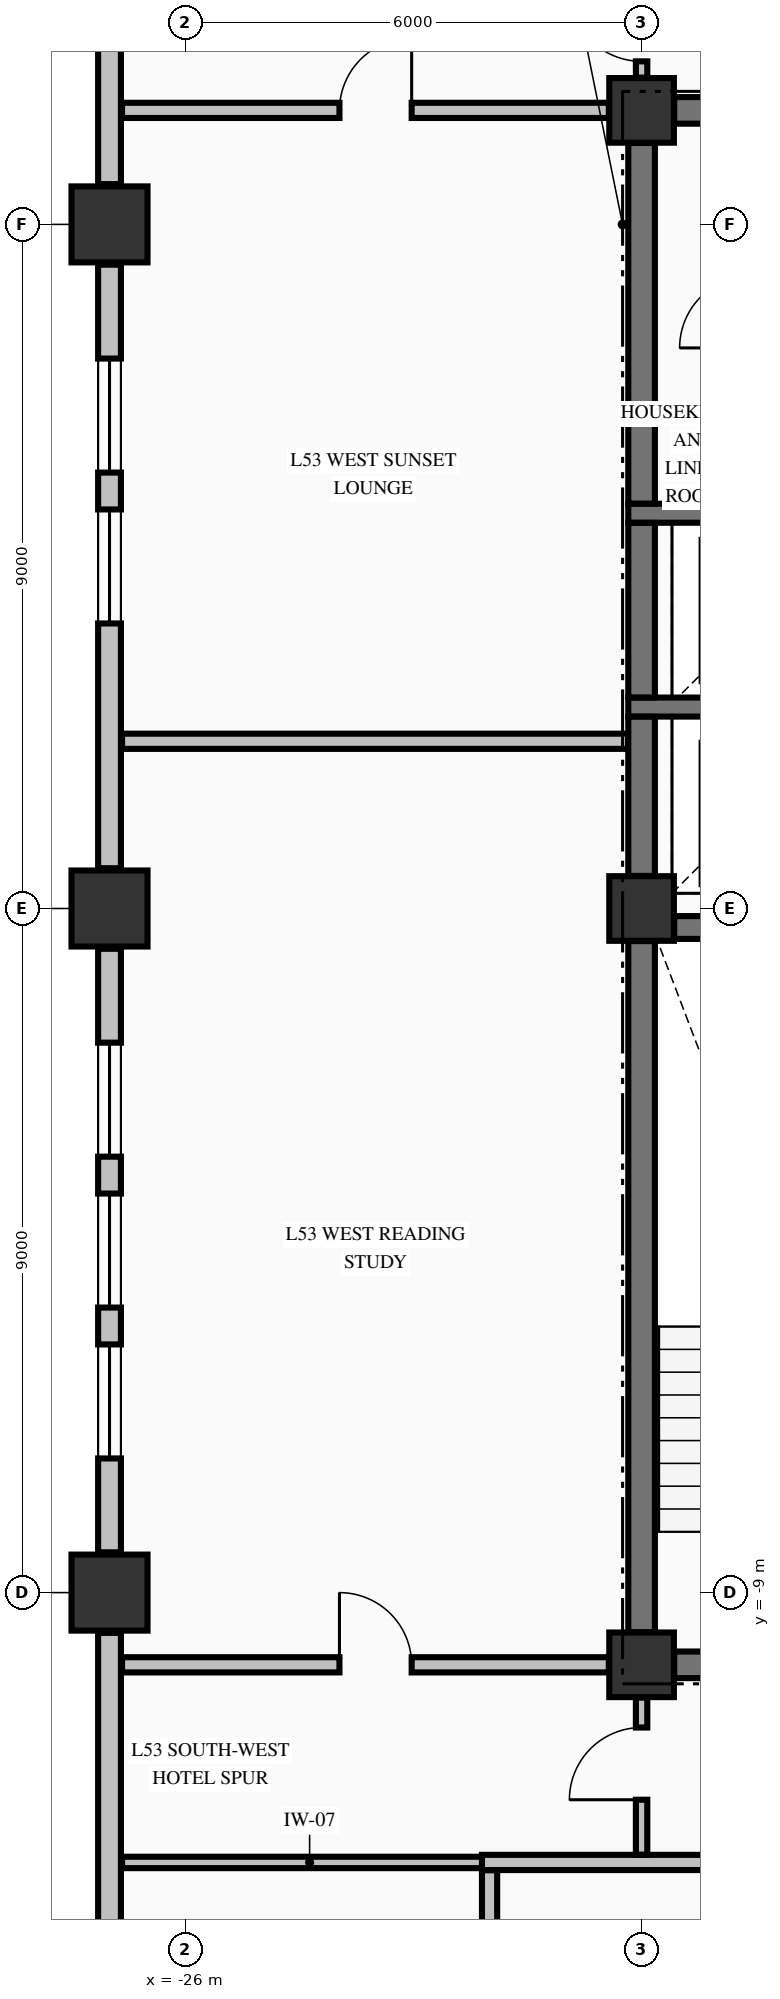
"""IFC4 building model, lengths in metres.
Left out: names, types, materials, properties, quantities, classifications, styles, units other than length and angle.
Written with IfcOpenShell. Run it as: python <this file> out.ifc"""

import sys

from ifc_helpers import new_model, si_unit, direction, frame, frame_2d, origin, origin_2d, place, context, subcontext, project, spatial, rectangle, extrude, element, fill, save


model = new_model("IFC4")
c1 = context("Model", 3, precision=1e-05, world=origin(), true_north=direction((0.0, 1.0)))
c2 = subcontext(c1, "Body", "Model", "MODEL_VIEW")
j1 = project(units=[si_unit("LENGTHUNIT", "METRE"), si_unit("PLANEANGLEUNIT", "RADIAN")], contexts=[c1])
p1 = place(None, origin())
s1 = spatial("IfcSite", under=j1, at=p1, CompositionType="ELEMENT")
p2 = place(p1, origin())
s2 = spatial("IfcBuilding", under=s1, at=p2, CompositionType="ELEMENT")
p3 = place(p2, frame((0.0, 0.0, 205.06)))
s3 = spatial("IfcBuildingStorey", under=s2, at=p3, CompositionType="ELEMENT", Elevation=205.06)
for number, where, z_axis, x_axis in (
    (1, (-27.0, -9.0, -0.25), (0.0, 0.0, 1.0), (1.0, 0.0, 0.0)),
    (2, (-27.0, 0.0, -0.25), (0.0, 0.0, 1.0), (1.0, 0.0, 0.0)),
    (3, (-27.0, 9.0, -0.25), (0.0, 0.0, 1.0), (1.0, 0.0, 0.0)),
):
    element("IfcColumn", number, at=place(p3, frame(where, z_axis=z_axis, x_axis=x_axis)), inside=s3, PredefinedType="COLUMN", context=c2, shape_type="SweptSolid", body=[
        extrude(rectangle(XDim=1.0, YDim=1.0, at=origin_2d()), origin(), (0.0, 0.0, 1.0), 3.4),
    ])
for number, where, z_axis, x_axis in (
    (4, (-20.0, -9.95, -0.25), (0.0, 0.0, 1.0), (1.0, 0.0, 0.0)),
    (5, (-20.0, 10.5, -0.25), (0.0, 0.0, 1.0), (1.0, 0.0, 0.0)),
    (6, (-20.0, 0.0, -0.25), (0.0, 0.0, 1.0), (1.0, 0.0, 0.0)),
):
    element("IfcColumn", number, at=place(p3, frame(where, z_axis=z_axis, x_axis=x_axis)), inside=s3, PredefinedType="COLUMN", context=c2, shape_type="SweptSolid", body=[
        extrude(rectangle(XDim=0.85, YDim=0.85, at=origin_2d()), origin(), (0.0, 0.0, 1.0), 3.4),
    ])
p4 = place(p3, frame((-27.0, -9.53, 0.0), z_axis=(0.0, 0.0, 1.0), x_axis=(0.0, -1.0, 0.0)))
e7 = element("IfcWall", 7, at=p4, inside=s3, PredefinedType="STANDARD", context=c2, shape_type="SweptSolid", body=[
    extrude(rectangle(XDim=9.44, YDim=0.3, at=frame_2d((4.72, 0.0))), origin(), (0.0, 0.0, 1.0), 2.542),
])
p5 = place(p3, frame((-27.0, -0.53, 0.0), z_axis=(0.0, 0.0, 1.0), x_axis=(0.0, -1.0, 0.0)))
e8 = element("IfcWall", 8, at=p5, inside=s3, PredefinedType="STANDARD", context=c2, shape_type="SweptSolid", body=[
    extrude(rectangle(XDim=7.94, YDim=0.3, at=frame_2d((3.97, 0.0))), origin(), (0.0, 0.0, 1.0), 2.542),
])
p6 = place(p5, frame((1.235, 0.0, 0.72)))
e9 = element("IfcOpeningElement", 9, at=p6, cuts=e8, PredefinedType="OPENING", context=c2, shape_type="SweptSolid", body=[
    extrude(rectangle(XDim=1.5, YDim=1.6, at=frame_2d((0.75, 0.8))), frame((0.0, 0.16, 0.0), z_axis=(0.0, -1.0, 0.0), x_axis=(1.0, 0.0, 0.0)), (0.0, 0.0, 1.0), 0.32),
])
p7 = place(p5, frame((3.22, 0.0, 0.72)))
e10 = element("IfcOpeningElement", 10, at=p7, cuts=e8, PredefinedType="OPENING", context=c2, shape_type="SweptSolid", body=[
    extrude(rectangle(XDim=1.5, YDim=1.6, at=frame_2d((0.75, 0.8))), frame((0.0, 0.16, 0.0), z_axis=(0.0, -1.0, 0.0), x_axis=(1.0, 0.0, 0.0)), (0.0, 0.0, 1.0), 0.32),
])
p8 = place(p5, frame((5.205, 0.0, 0.72)))
e11 = element("IfcOpeningElement", 11, at=p8, cuts=e8, PredefinedType="OPENING", context=c2, shape_type="SweptSolid", body=[
    extrude(rectangle(XDim=1.5, YDim=1.6, at=frame_2d((0.75, 0.8))), frame((0.0, 0.16, 0.0), z_axis=(0.0, -1.0, 0.0), x_axis=(1.0, 0.0, 0.0)), (0.0, 0.0, 1.0), 0.32),
])
p9 = place(p3, frame((-27.0, 8.47, 0.0), z_axis=(0.0, 0.0, 1.0), x_axis=(0.0, -1.0, 0.0)))
e12 = element("IfcWall", 12, at=p9, inside=s3, PredefinedType="STANDARD", context=c2, shape_type="SweptSolid", body=[
    extrude(rectangle(XDim=7.94, YDim=0.3, at=frame_2d((3.97, 0.0))), origin(), (0.0, 0.0, 1.0), 2.542),
])
p10 = place(p9, frame((1.235, 0.0, 0.72)))
e13 = element("IfcOpeningElement", 13, at=p10, cuts=e12, PredefinedType="OPENING", context=c2, shape_type="SweptSolid", body=[
    extrude(rectangle(XDim=1.5, YDim=1.6, at=frame_2d((0.75, 0.8))), frame((0.0, 0.16, 0.0), z_axis=(0.0, -1.0, 0.0), x_axis=(1.0, 0.0, 0.0)), (0.0, 0.0, 1.0), 0.32),
])
p11 = place(p9, frame((3.22, 0.0, 0.72)))
e14 = element("IfcOpeningElement", 14, at=p11, cuts=e12, PredefinedType="OPENING", context=c2, shape_type="SweptSolid", body=[
    extrude(rectangle(XDim=1.5, YDim=1.6, at=frame_2d((0.75, 0.8))), frame((0.0, 0.16, 0.0), z_axis=(0.0, -1.0, 0.0), x_axis=(1.0, 0.0, 0.0)), (0.0, 0.0, 1.0), 0.32),
])
p12 = place(p3, frame((-27.0, 18.97, 0.0), z_axis=(0.0, 0.0, 1.0), x_axis=(0.0, -1.0, 0.0)))
e15 = element("IfcWall", 15, at=p12, inside=s3, PredefinedType="STANDARD", context=c2, shape_type="SweptSolid", body=[
    extrude(rectangle(XDim=9.44, YDim=0.3, at=frame_2d((4.72, 0.0))), origin(), (0.0, 0.0, 1.0), 2.542),
])
p13 = place(p3, frame((-19.571, -9.95, 0.0), z_axis=(0.0, 0.0, 1.0), x_axis=(1.0, 0.0, 0.0)))
e16 = element("IfcWall", 16, at=p13, inside=s3, PredefinedType="SHEAR", context=c2, shape_type="SweptSolid", body=[
    extrude(rectangle(XDim=4.871, YDim=0.35, at=frame_2d((2.436, 0.0))), origin(), (0.0, 0.0, 1.0), 3.15),
])
p14 = place(p13, frame((0.746, 0.0, 0.0)))
e17 = element("IfcOpeningElement", 17, at=p14, cuts=e16, PredefinedType="OPENING", context=c2, shape_type="SweptSolid", body=[
    extrude(rectangle(XDim=1.05, YDim=2.15, at=frame_2d((0.525, 1.075))), frame((0.0, 0.185, 0.0), z_axis=(0.0, -1.0, 0.0), x_axis=(1.0, 0.0, 0.0)), (0.0, 0.0, 1.0), 0.37),
])
p15 = place(p3, frame((-19.571, -0.25, 0.0), z_axis=(0.0, 0.0, 1.0), x_axis=(1.0, 0.0, 0.0)))
e18 = element("IfcWall", 18, at=p15, inside=s3, PredefinedType="SHEAR", context=c2, shape_type="SweptSolid", body=[
    extrude(rectangle(XDim=8.142, YDim=0.3, at=frame_2d((4.071, 0.0))), origin(), (0.0, 0.0, 1.0), 3.15),
])
p16 = place(p15, frame((5.871, 0.0, 0.0)))
e19 = element("IfcOpeningElement", 19, at=p16, cuts=e18, PredefinedType="OPENING", context=c2, shape_type="SweptSolid", body=[
    extrude(rectangle(XDim=1.1, YDim=2.15, at=frame_2d((0.55, 1.075))), frame((0.0, 0.16, 0.0), z_axis=(0.0, -1.0, 0.0), x_axis=(1.0, 0.0, 0.0)), (0.0, 0.0, 1.0), 0.32),
])
for number, where, z_axis, x_axis in (
    (20, (-20.175, 2.65, 0.0), (0.0, 0.0, 1.0), (1.0, 0.0, 0.0)),
    (21, (-20.175, 5.2, 0.0), (0.0, 0.0, 1.0), (1.0, 0.0, 0.0)),
):
    element("IfcWall", number, at=place(p3, frame(where, z_axis=z_axis, x_axis=x_axis)), inside=s3, PredefinedType="SOLIDWALL", context=c2, shape_type="SweptSolid", body=[
        extrude(rectangle(XDim=3.2, YDim=0.25, at=frame_2d((1.6, 0.0))), origin(), (0.0, 0.0, 1.0), 3.15),
    ])
p17 = place(p3, frame((-19.571, 10.5, 0.0), z_axis=(0.0, 0.0, 1.0), x_axis=(1.0, 0.0, 0.0)))
e22 = element("IfcWall", 22, at=p17, inside=s3, PredefinedType="SHEAR", context=c2, shape_type="SweptSolid", body=[
    extrude(rectangle(XDim=4.871, YDim=0.35, at=frame_2d((2.436, 0.0))), origin(), (0.0, 0.0, 1.0), 3.15),
])
p18 = place(p17, frame((3.121, 0.0, 0.0)))
e23 = element("IfcOpeningElement", 23, at=p18, cuts=e22, PredefinedType="OPENING", context=c2, shape_type="SweptSolid", body=[
    extrude(rectangle(XDim=1.1, YDim=2.15, at=frame_2d((0.55, 1.075))), frame((0.0, 0.185, 0.0), z_axis=(0.0, -1.0, 0.0), x_axis=(1.0, 0.0, 0.0)), (0.0, 0.0, 1.0), 0.37),
])
p19 = place(p17, frame((1.276, 0.0, 0.0)))
e24 = element("IfcOpeningElement", 24, at=p19, cuts=e22, PredefinedType="OPENING", context=c2, shape_type="SweptSolid", body=[
    extrude(rectangle(XDim=0.95, YDim=2.15, at=frame_2d((0.475, 1.075))), frame((0.0, 0.185, 0.0), z_axis=(0.0, -1.0, 0.0), x_axis=(1.0, 0.0, 0.0)), (0.0, 0.0, 1.0), 0.37),
])
p20 = place(p3, frame((-26.835, -12.55, 0.0), z_axis=(0.0, 0.0, 1.0), x_axis=(1.0, 0.0, 0.0)))
e25 = element("IfcWall", 25, at=p20, inside=s3, PredefinedType="PARTITIONING", context=c2, shape_type="SweptSolid", body=[
    extrude(rectangle(XDim=4.935, YDim=0.15, at=frame_2d((2.468, 0.0))), origin(), (0.0, 0.0, 1.0), 3.15),
])
p21 = place(p3, frame((-22.1, -12.55, 0.0), z_axis=(0.0, 0.0, 1.0), x_axis=(1.0, 0.0, 0.0)))
e26 = element("IfcWall", 26, at=p21, inside=s3, PredefinedType="PARTITIONING", context=c2, shape_type="SweptSolid", body=[
    extrude(rectangle(XDim=39.2, YDim=0.2, at=frame_2d((19.6, 0.0))), origin(), (0.0, 0.0, 1.0), 3.15),
])
p22 = place(p21, frame((3.525, 0.0, 0.0)))
e27 = element("IfcOpeningElement", 27, at=p22, cuts=e26, PredefinedType="OPENING", context=c2, shape_type="SweptSolid", body=[
    extrude(rectangle(XDim=0.95, YDim=2.15, at=frame_2d((0.475, 1.075))), frame((0.0, 0.11, 0.0), z_axis=(0.0, -1.0, 0.0), x_axis=(1.0, 0.0, 0.0)), (0.0, 0.0, 1.0), 0.22),
])
p23 = place(p21, frame((11.475, 0.0, 0.0)))
e28 = element("IfcOpeningElement", 28, at=p23, cuts=e26, PredefinedType="OPENING", context=c2, shape_type="SweptSolid", body=[
    extrude(rectangle(XDim=0.95, YDim=2.15, at=frame_2d((0.475, 1.075))), frame((0.0, 0.11, 0.0), z_axis=(0.0, -1.0, 0.0), x_axis=(1.0, 0.0, 0.0)), (0.0, 0.0, 1.0), 0.22),
])
p24 = place(p21, frame((19.775, 0.0, 0.0)))
e29 = element("IfcOpeningElement", 29, at=p24, cuts=e26, PredefinedType="OPENING", context=c2, shape_type="SweptSolid", body=[
    extrude(rectangle(XDim=0.95, YDim=2.15, at=frame_2d((0.475, 1.075))), frame((0.0, 0.11, 0.0), z_axis=(0.0, -1.0, 0.0), x_axis=(1.0, 0.0, 0.0)), (0.0, 0.0, 1.0), 0.22),
])
p25 = place(p21, frame((34.675, 0.0, 0.0)))
e30 = element("IfcOpeningElement", 30, at=p25, cuts=e26, PredefinedType="OPENING", context=c2, shape_type="SweptSolid", body=[
    extrude(rectangle(XDim=0.95, YDim=2.15, at=frame_2d((0.475, 1.075))), frame((0.0, 0.11, 0.0), z_axis=(0.0, -1.0, 0.0), x_axis=(1.0, 0.0, 0.0)), (0.0, 0.0, 1.0), 0.22),
])
p26 = place(p3, frame((-26.835, -9.95, 0.0), z_axis=(0.0, 0.0, 1.0), x_axis=(1.0, 0.0, 0.0)))
e31 = element("IfcWall", 31, at=p26, inside=s3, PredefinedType="PARTITIONING", context=c2, shape_type="SweptSolid", body=[
    extrude(rectangle(XDim=6.404, YDim=0.2, at=frame_2d((3.202, 0.0))), origin(), (0.0, 0.0, 1.0), 3.15),
])
p27 = place(p26, frame((2.86, 0.0, 0.0)))
e32 = element("IfcOpeningElement", 32, at=p27, cuts=e31, PredefinedType="OPENING", context=c2, shape_type="SweptSolid", body=[
    extrude(rectangle(XDim=0.95, YDim=2.15, at=frame_2d((0.475, 1.075))), frame((0.0, 0.11, 0.0), z_axis=(0.0, -1.0, 0.0), x_axis=(1.0, 0.0, 0.0)), (0.0, 0.0, 1.0), 0.22),
])
p28 = place(p3, frame((-26.835, 2.2, 0.0), z_axis=(0.0, 0.0, 1.0), x_axis=(1.0, 0.0, 0.0)))
e33 = element("IfcWall", 33, at=p28, inside=s3, PredefinedType="PARTITIONING", context=c2, shape_type="SweptSolid", body=[
    extrude(rectangle(XDim=6.657, YDim=0.2, at=frame_2d((3.329, 0.0))), origin(), (0.0, 0.0, 1.0), 3.15),
])
p29 = place(p3, frame((-26.835, 10.5, 0.0), z_axis=(0.0, 0.0, 1.0), x_axis=(1.0, 0.0, 0.0)))
e34 = element("IfcWall", 34, at=p29, inside=s3, PredefinedType="PARTITIONING", context=c2, shape_type="SweptSolid", body=[
    extrude(rectangle(XDim=6.404, YDim=0.2, at=frame_2d((3.202, 0.0))), origin(), (0.0, 0.0, 1.0), 3.15),
])
p30 = place(p29, frame((2.86, 0.0, 0.0)))
e35 = element("IfcOpeningElement", 35, at=p30, cuts=e34, PredefinedType="OPENING", context=c2, shape_type="SweptSolid", body=[
    extrude(rectangle(XDim=0.95, YDim=2.15, at=frame_2d((0.475, 1.075))), frame((0.0, 0.11, 0.0), z_axis=(0.0, -1.0, 0.0), x_axis=(1.0, 0.0, 0.0)), (0.0, 0.0, 1.0), 0.22),
])
p31 = place(p3, frame((-20.0, -9.521, 0.0), z_axis=(0.0, 0.0, 1.0), x_axis=(0.0, 1.0, 0.0)))
e36 = element("IfcWall", 36, at=p31, inside=s3, PredefinedType="SHEAR", context=c2, shape_type="SweptSolid", body=[
    extrude(rectangle(XDim=9.092, YDim=0.35, at=frame_2d((4.546, 0.0))), origin(), (0.0, 0.0, 1.0), 3.15),
])
p32 = place(p3, frame((-20.0, 0.429, 0.0), z_axis=(0.0, 0.0, 1.0), x_axis=(0.0, 1.0, 0.0)))
e37 = element("IfcWall", 37, at=p32, inside=s3, PredefinedType="SHEAR", context=c2, shape_type="SweptSolid", body=[
    extrude(rectangle(XDim=2.094, YDim=0.35, at=frame_2d((1.047, 0.0))), origin(), (0.0, 0.0, 1.0), 3.15),
])
p33 = place(p3, frame((-20.0, 2.777, 0.0), z_axis=(0.0, 0.0, 1.0), x_axis=(0.0, 1.0, 0.0)))
e38 = element("IfcWall", 38, at=p33, inside=s3, PredefinedType="SHEAR", context=c2, shape_type="SweptSolid", body=[
    extrude(rectangle(XDim=2.296, YDim=0.35, at=frame_2d((1.148, 0.0))), origin(), (0.0, 0.0, 1.0), 3.15),
])
p34 = place(p3, frame((-20.0, 5.327, 0.0), z_axis=(0.0, 0.0, 1.0), x_axis=(0.0, 1.0, 0.0)))
e39 = element("IfcWall", 39, at=p34, inside=s3, PredefinedType="SHEAR", context=c2, shape_type="SweptSolid", body=[
    extrude(rectangle(XDim=4.744, YDim=0.35, at=frame_2d((2.372, 0.0))), origin(), (0.0, 0.0, 1.0), 3.15),
])
p35 = place(p3, frame((-22.0, -18.994, 0.0), z_axis=(0.0, 0.0, 1.0), x_axis=(0.0, 1.0, 0.0)))
e40 = element("IfcWall", 40, at=p35, inside=s3, PredefinedType="PARTITIONING", context=c2, shape_type="SweptSolid", body=[
    extrude(rectangle(XDim=6.341, YDim=0.2, at=frame_2d((3.17, 0.0))), origin(), (0.0, 0.0, 1.0), 3.15),
])
p36 = place(p3, frame((-20.0, -12.447, 0.0), z_axis=(0.0, 0.0, 1.0), x_axis=(0.0, 1.0, 0.0)))
e41 = element("IfcWall", 41, at=p36, inside=s3, PredefinedType="PARTITIONING", context=c2, shape_type="SweptSolid", body=[
    extrude(rectangle(XDim=2.066, YDim=0.15, at=frame_2d((1.033, 0.0))), origin(), (0.0, 0.0, 1.0), 2.342),
])
p37 = place(p36, frame((0.722, 0.0, 0.0)))
e42 = element("IfcOpeningElement", 42, at=p37, cuts=e41, PredefinedType="OPENING", context=c2, shape_type="SweptSolid", body=[
    extrude(rectangle(XDim=0.95, YDim=2.15, at=frame_2d((0.475, 1.075))), frame((0.0, 0.085, 0.0), z_axis=(0.0, -1.0, 0.0), x_axis=(1.0, 0.0, 0.0)), (0.0, 0.0, 1.0), 0.17),
])
p38 = place(p3, frame((-20.0, 10.931, 0.0), z_axis=(0.0, 0.0, 1.0), x_axis=(0.0, 1.0, 0.0)))
e43 = element("IfcWall", 43, at=p38, inside=s3, PredefinedType="PARTITIONING", context=c2, shape_type="SweptSolid", body=[
    extrude(rectangle(XDim=1.716, YDim=0.15, at=frame_2d((0.858, 0.0))), origin(), (0.0, 0.0, 1.0), 2.342),
])
p39 = place(p38, frame((0.214, 0.0, 0.0)))
e44 = element("IfcOpeningElement", 44, at=p39, cuts=e43, PredefinedType="OPENING", context=c2, shape_type="SweptSolid", body=[
    extrude(rectangle(XDim=0.95, YDim=2.15, at=frame_2d((0.475, 1.075))), frame((0.0, 0.085, 0.0), z_axis=(0.0, -1.0, 0.0), x_axis=(1.0, 0.0, 0.0)), (0.0, 0.0, 1.0), 0.17),
])
p40 = place(p6, origin())
e45 = element("IfcWindow", 45, at=p40, inside=s3, PartitioningType="SINGLE_PANEL", PredefinedType="WINDOW", context=c2, shape_type="SweptSolid", body=[
    extrude(rectangle(XDim=1.5, YDim=1.6, at=frame_2d((0.75, 0.8))), frame((0.0, 0.03, 0.0), z_axis=(0.0, -1.0, 0.0), x_axis=(1.0, 0.0, 0.0)), (0.0, 0.0, 1.0), 0.06),
])
fill(e9, e45)
p41 = place(p7, origin())
e46 = element("IfcWindow", 46, at=p41, inside=s3, PartitioningType="SINGLE_PANEL", PredefinedType="WINDOW", context=c2, shape_type="SweptSolid", body=[
    extrude(rectangle(XDim=1.5, YDim=1.6, at=frame_2d((0.75, 0.8))), frame((0.0, 0.03, 0.0), z_axis=(0.0, -1.0, 0.0), x_axis=(1.0, 0.0, 0.0)), (0.0, 0.0, 1.0), 0.06),
])
fill(e10, e46)
p42 = place(p8, origin())
e47 = element("IfcWindow", 47, at=p42, inside=s3, PartitioningType="SINGLE_PANEL", PredefinedType="WINDOW", context=c2, shape_type="SweptSolid", body=[
    extrude(rectangle(XDim=1.5, YDim=1.6, at=frame_2d((0.75, 0.8))), frame((0.0, 0.03, 0.0), z_axis=(0.0, -1.0, 0.0), x_axis=(1.0, 0.0, 0.0)), (0.0, 0.0, 1.0), 0.06),
])
fill(e11, e47)
p43 = place(p10, origin())
e48 = element("IfcWindow", 48, at=p43, inside=s3, PartitioningType="SINGLE_PANEL", PredefinedType="WINDOW", context=c2, shape_type="SweptSolid", body=[
    extrude(rectangle(XDim=1.5, YDim=1.6, at=frame_2d((0.75, 0.8))), frame((0.0, 0.03, 0.0), z_axis=(0.0, -1.0, 0.0), x_axis=(1.0, 0.0, 0.0)), (0.0, 0.0, 1.0), 0.06),
])
fill(e13, e48)
p44 = place(p11, origin())
e49 = element("IfcWindow", 49, at=p44, inside=s3, PartitioningType="SINGLE_PANEL", PredefinedType="WINDOW", context=c2, shape_type="SweptSolid", body=[
    extrude(rectangle(XDim=1.5, YDim=1.6, at=frame_2d((0.75, 0.8))), frame((0.0, 0.03, 0.0), z_axis=(0.0, -1.0, 0.0), x_axis=(1.0, 0.0, 0.0)), (0.0, 0.0, 1.0), 0.06),
])
fill(e14, e49)
p45 = place(p39, origin())
e50 = element("IfcDoor", 50, at=p45, inside=s3, OperationType="SINGLE_SWING_RIGHT", PredefinedType="DOOR", context=c2, shape_type="SweptSolid", body=[
    extrude(rectangle(XDim=0.95, YDim=2.15, at=frame_2d((0.475, 1.075))), frame((0.0, 0.025, 0.0), z_axis=(0.0, -1.0, 0.0), x_axis=(1.0, 0.0, 0.0)), (0.0, 0.0, 1.0), 0.05),
])
fill(e44, e50)
p46 = place(p37, origin())
e51 = element("IfcDoor", 51, at=p46, inside=s3, OperationType="SINGLE_SWING_LEFT", PredefinedType="DOOR", context=c2, shape_type="SweptSolid", body=[
    extrude(rectangle(XDim=0.95, YDim=2.15, at=frame_2d((0.475, 1.075))), frame((0.0, 0.025, 0.0), z_axis=(0.0, -1.0, 0.0), x_axis=(1.0, 0.0, 0.0)), (0.0, 0.0, 1.0), 0.05),
])
fill(e42, e51)
p47 = place(p30, origin())
e52 = element("IfcDoor", 52, at=p47, inside=s3, OperationType="SINGLE_SWING_RIGHT", PredefinedType="DOOR", context=c2, shape_type="SweptSolid", body=[
    extrude(rectangle(XDim=0.95, YDim=2.15, at=frame_2d((0.475, 1.075))), frame((0.0, 0.025, 0.0), z_axis=(0.0, -1.0, 0.0), x_axis=(1.0, 0.0, 0.0)), (0.0, 0.0, 1.0), 0.05),
])
fill(e35, e52)
p48 = place(p27, origin())
e53 = element("IfcDoor", 53, at=p48, inside=s3, OperationType="SINGLE_SWING_LEFT", PredefinedType="DOOR", context=c2, shape_type="SweptSolid", body=[
    extrude(rectangle(XDim=0.95, YDim=2.15, at=frame_2d((0.475, 1.075))), frame((0.0, 0.025, 0.0), z_axis=(0.0, -1.0, 0.0), x_axis=(1.0, 0.0, 0.0)), (0.0, 0.0, 1.0), 0.05),
])
fill(e32, e53)
save(model, sys.argv[1])
